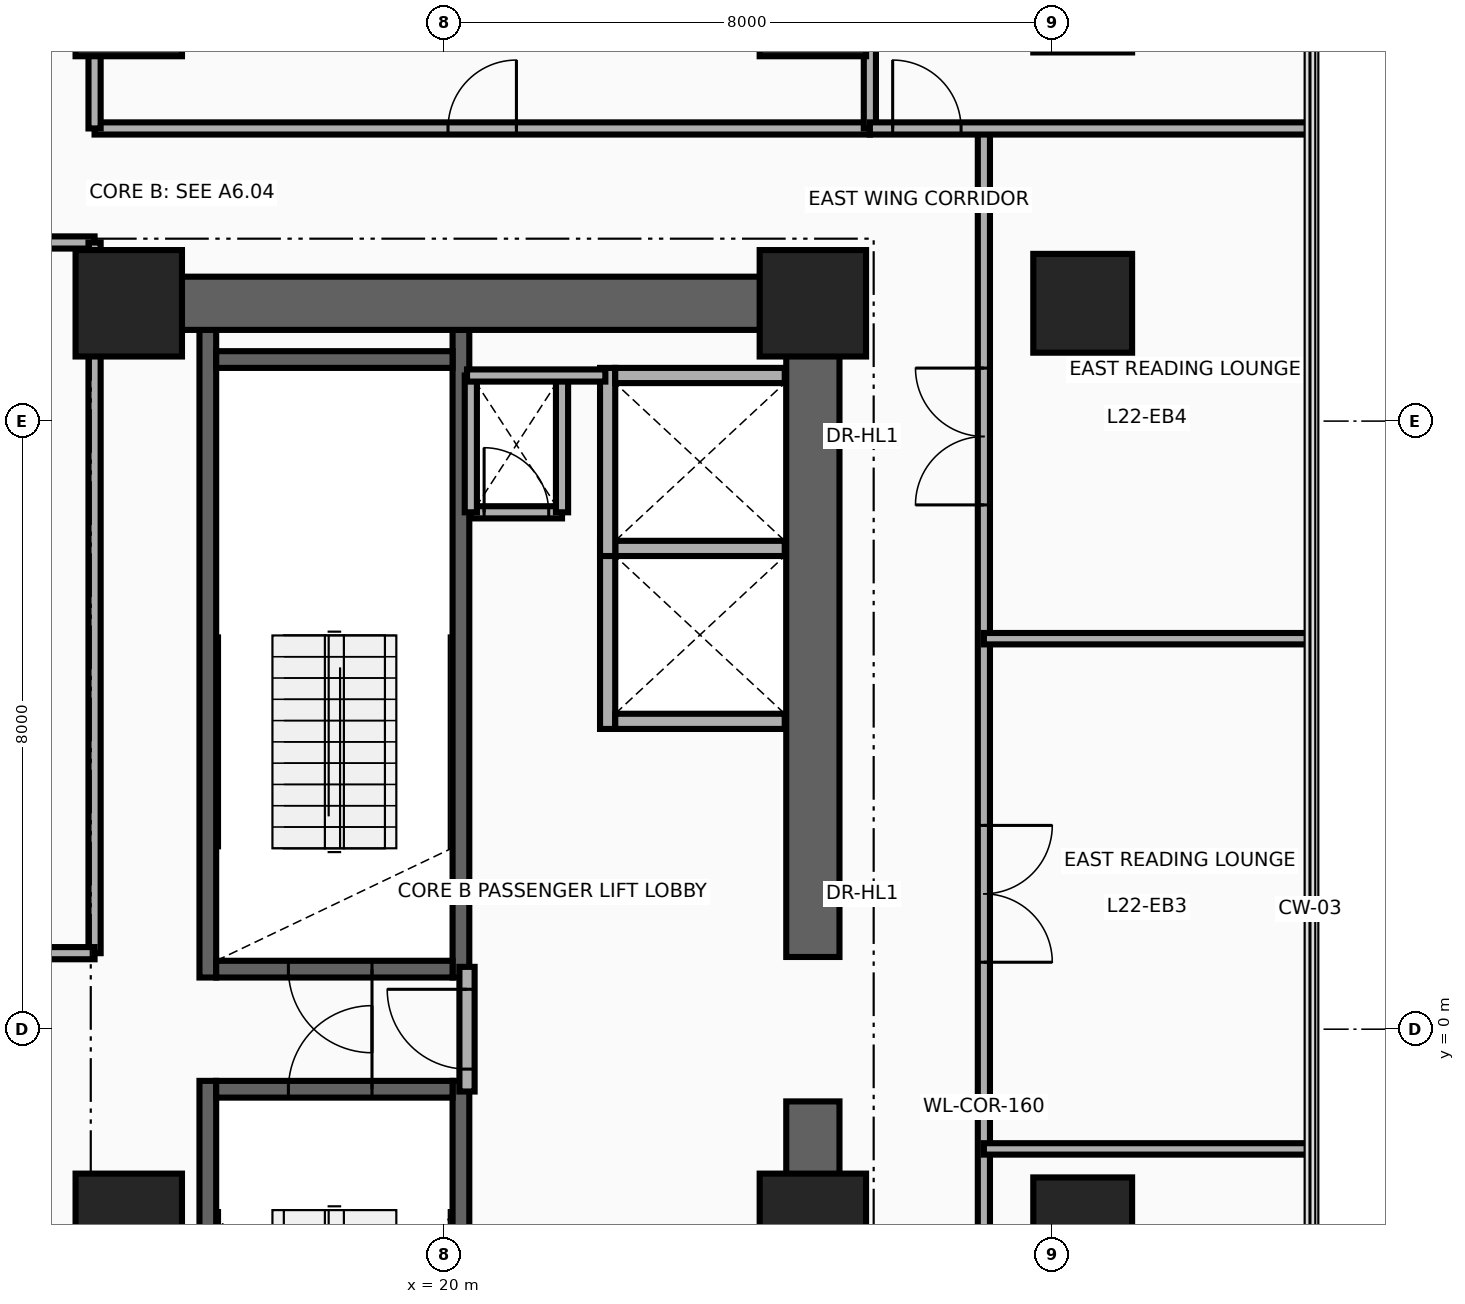
"""IFC4 building model, lengths in metres.
Left out: names, types, materials, properties, quantities, classifications, styles, units other than length and angle.
Written with IfcOpenShell. Run it as: python <this file> out.ifc"""

import sys

from ifc_helpers import new_model, si_unit, direction, frame, frame_2d, origin, origin_2d, place, context, subcontext, project, spatial, rectangle, circle, extrude, source, transform, mapped, element, fill, save


model = new_model("IFC4")
c1 = context("Model", 3, precision=1e-05, world=origin(), true_north=direction((0.0, 1.0)))
c2 = subcontext(c1, "Body", "Model", "MODEL_VIEW")
j1 = project(units=[si_unit("LENGTHUNIT", "METRE"), si_unit("PLANEANGLEUNIT", "RADIAN")], contexts=[c1])
p1 = place(None, origin())
s1 = spatial("IfcSite", under=j1, at=p1, CompositionType="ELEMENT")
p2 = place(p1, origin())
s2 = spatial("IfcBuilding", under=s1, at=p2, CompositionType="ELEMENT")
p3 = place(p2, frame((0.0, 0.0, 88.9)))
s3 = spatial("IfcBuildingStorey", under=s2, at=p3, CompositionType="ELEMENT", Elevation=88.9)
for number, where, z_axis, x_axis in (
    (1, (16.89, 0.68, 0.0), (0.0, 0.0, 1.0), (0.0, 1.0, 0.0)),
    (2, (20.22, 0.68, 0.0), (0.0, 0.0, 1.0), (0.0, 1.0, 0.0)),
):
    element("IfcWall", number, at=place(p3, frame(where, z_axis=z_axis, x_axis=x_axis)), inside=s3, PredefinedType="SHEAR", context=c2, shape_type="SweptSolid", body=[
        extrude(rectangle(XDim=8.52, YDim=0.22, at=frame_2d((4.26, 0.0))), origin(), (0.0, 0.0, 1.0), 3.46),
    ])
p4 = place(p3, frame((17.0, 0.79, 0.0), z_axis=(0.0, 0.0, 1.0), x_axis=(1.0, 0.0, 0.0)))
e3 = element("IfcWall", 3, at=p4, inside=s3, PredefinedType="SHEAR", context=c2, shape_type="SweptSolid", body=[
    extrude(rectangle(XDim=3.11, YDim=0.22, at=frame_2d((1.555, 0.0))), origin(), (0.0, 0.0, 1.0), 3.46),
])
p5 = place(p4, frame((0.95, 0.0, 0.0)))
e4 = element("IfcOpeningElement", 4, at=p5, cuts=e3, PredefinedType="OPENING", context=c2, shape_type="SweptSolid", body=[
    extrude(rectangle(XDim=1.1, YDim=2.15, at=frame_2d((0.55, 1.075))), frame((0.0, 0.125, 0.0), z_axis=(0.0, -1.0, 0.0), x_axis=(1.0, 0.0, 0.0)), (0.0, 0.0, 1.0), 0.25),
])
p6 = place(p3, frame((17.0, 8.81, 0.0), z_axis=(0.0, 0.0, 1.0), x_axis=(1.0, 0.0, 0.0)))
e5 = element("IfcWall", 5, at=p6, inside=s3, PredefinedType="SHEAR", context=c2, shape_type="SweptSolid", body=[
    extrude(rectangle(XDim=3.11, YDim=0.22, at=frame_2d((1.555, 0.0))), origin(), (0.0, 0.0, 1.0), 3.46),
])
for number, where, z_axis, x_axis in (
    (6, (16.89, -9.2, 0.0), (0.0, 0.0, 1.0), (0.0, 1.0, 0.0)),
    (7, (20.22, -9.2, 0.0), (0.0, 0.0, 1.0), (0.0, 1.0, 0.0)),
):
    element("IfcWall", number, at=place(p3, frame(where, z_axis=z_axis, x_axis=x_axis)), inside=s3, PredefinedType="SHEAR", context=c2, shape_type="SweptSolid", body=[
        extrude(rectangle(XDim=8.52, YDim=0.22, at=frame_2d((4.26, 0.0))), origin(), (0.0, 0.0, 1.0), 3.46),
    ])
p7 = place(p3, frame((17.0, -0.79, 0.0), z_axis=(0.0, 0.0, 1.0), x_axis=(1.0, 0.0, 0.0)))
e8 = element("IfcWall", 8, at=p7, inside=s3, PredefinedType="SHEAR", context=c2, shape_type="SweptSolid", body=[
    extrude(rectangle(XDim=3.11, YDim=0.22, at=frame_2d((1.555, 0.0))), origin(), (0.0, 0.0, 1.0), 3.46),
])
p8 = place(p7, frame((0.95, 0.0, 0.0)))
e9 = element("IfcOpeningElement", 9, at=p8, cuts=e8, PredefinedType="OPENING", context=c2, shape_type="SweptSolid", body=[
    extrude(rectangle(XDim=1.1, YDim=2.15, at=frame_2d((0.55, 1.075))), frame((0.0, 0.125, 0.0), z_axis=(0.0, -1.0, 0.0), x_axis=(1.0, 0.0, 0.0)), (0.0, 0.0, 1.0), 0.25),
])
for number, where, z_axis, x_axis in (
    (10, (24.85, -9.9, 0.0), (0.0, 0.0, 1.0), (0.0, 1.0, 0.0)),
    (11, (24.85, 0.95, 0.0), (0.0, 0.0, 1.0), (0.0, 1.0, 0.0)),
):
    element("IfcWall", number, at=place(p3, frame(where, z_axis=z_axis, x_axis=x_axis)), inside=s3, PredefinedType="SHEAR", context=c2, shape_type="SweptSolid", body=[
        extrude(rectangle(XDim=8.95, YDim=0.7, at=frame_2d((4.475, 0.0))), origin(), (0.0, 0.0, 1.0), 3.46),
    ])
p9 = place(p3, frame((15.85, 9.55, 0.0), z_axis=(0.0, 0.0, 1.0), x_axis=(1.0, 0.0, 0.0)))
e12 = element("IfcWall", 12, at=p9, inside=s3, PredefinedType="SHEAR", context=c2, shape_type="SweptSolid", body=[
    extrude(rectangle(XDim=9.0, YDim=0.7, at=frame_2d((4.5, 0.0))), origin(), (0.0, 0.0, 1.0), 3.46),
])
m1 = source(origin(), c2, "Body", "SweptSolid", [
    extrude(rectangle(XDim=1.4, YDim=1.4, at=origin_2d()), origin(), (0.0, 0.0, 1.0), 3.7),
])
for number, where, z_axis, x_axis in (
    (13, (15.85, -2.6, 0.0), (0.0, 0.0, 1.0), (1.0, 0.0, 0.0)),
    (14, (24.85, -2.6, 0.0), (0.0, 0.0, 1.0), (1.0, 0.0, 0.0)),
):
    element("IfcColumn", number, at=place(p3, frame(where, z_axis=z_axis, x_axis=x_axis)), inside=s3, PredefinedType="COLUMN", context=c2, shape_type="MappedRepresentation", body=[
        mapped(m1, transform((0.0, 0.0, 0.0), x_axis=(1.0, 0.0, 0.0), y_axis=(0.0, 1.0, 0.0), z_axis=(0.0, 0.0, 1.0), scale=1.0)),
    ])
m2 = source(origin(), c2, "Body", "SweptSolid", [
    extrude(circle(Radius=0.65, at=origin_2d()), origin(), (0.0, 0.0, 1.0), 3.7),
])
p10 = place(p3, frame((28.4, -2.6, 0.0), z_axis=(0.0, 0.0, 1.0), x_axis=(1.0, 0.0, 0.0)))
e15 = element("IfcColumn", 15, at=p10, inside=s3, PredefinedType="COLUMN", context=c2, shape_type="MappedRepresentation", body=[
    mapped(m2, transform((0.0, 0.0, 0.0), x_axis=(1.0, 0.0, 0.0), y_axis=(0.0, 1.0, 0.0), z_axis=(0.0, 0.0, 1.0), scale=1.0)),
])
for number, where, z_axis, x_axis in (
    (16, (15.85, 9.55, 0.0), (0.0, 0.0, 1.0), (1.0, 0.0, 0.0)),
    (17, (24.85, 9.55, 0.0), (0.0, 0.0, 1.0), (1.0, 0.0, 0.0)),
):
    element("IfcColumn", number, at=place(p3, frame(where, z_axis=z_axis, x_axis=x_axis)), inside=s3, PredefinedType="COLUMN", context=c2, shape_type="MappedRepresentation", body=[
        mapped(m1, transform((0.0, 0.0, 0.0), x_axis=(1.0, 0.0, 0.0), y_axis=(0.0, 1.0, 0.0), z_axis=(0.0, 0.0, 1.0), scale=1.0)),
    ])
p11 = place(p3, frame((28.4, 9.55, 0.0), z_axis=(0.0, 0.0, 1.0), x_axis=(1.0, 0.0, 0.0)))
e18 = element("IfcColumn", 18, at=p11, inside=s3, PredefinedType="COLUMN", context=c2, shape_type="MappedRepresentation", body=[
    mapped(m2, transform((0.0, 0.0, 0.0), x_axis=(1.0, 0.0, 0.0), y_axis=(0.0, 1.0, 0.0), z_axis=(0.0, 0.0, 1.0), scale=1.0)),
])
for number, where, z_axis, x_axis in (
    (19, (15.85, 13.5, 0.0), (0.0, 0.0, 1.0), (1.0, 0.0, 0.0)),
    (20, (24.85, 13.5, 0.0), (0.0, 0.0, 1.0), (1.0, 0.0, 0.0)),
):
    element("IfcColumn", number, at=place(p3, frame(where, z_axis=z_axis, x_axis=x_axis)), inside=s3, PredefinedType="COLUMN", context=c2, shape_type="MappedRepresentation", body=[
        mapped(m1, transform((0.0, 0.0, 0.0), x_axis=(1.0, 0.0, 0.0), y_axis=(0.0, 1.0, 0.0), z_axis=(0.0, 0.0, 1.0), scale=1.0)),
    ])
p12 = place(p3, frame((22.15, 3.95, 0.0), z_axis=(0.0, 0.0, 1.0), x_axis=(0.0, 1.0, 0.0)))
e21 = element("IfcWall", 21, at=p12, inside=s3, PredefinedType="MOVABLE", context=c2, shape_type="SweptSolid", body=[
    extrude(rectangle(XDim=2.475, YDim=0.2, at=frame_2d((1.238, 0.0))), origin(), (0.0, 0.0, 1.0), 3.46),
])
for number, where, z_axis, x_axis in (
    (22, (22.25, 4.05, 0.0), (0.0, 0.0, 1.0), (1.0, 0.0, 0.0)),
    (23, (22.25, 6.325, 0.0), (0.0, 0.0, 1.0), (1.0, 0.0, 0.0)),
):
    element("IfcWall", number, at=place(p3, frame(where, z_axis=z_axis, x_axis=x_axis)), inside=s3, PredefinedType="MOVABLE", context=c2, shape_type="SweptSolid", body=[
        extrude(rectangle(XDim=2.23, YDim=0.2, at=frame_2d((1.115, 0.0))), origin(), (0.0, 0.0, 1.0), 2.245),
    ])
p13 = place(p3, frame((22.15, 6.225, 0.0), z_axis=(0.0, 0.0, 1.0), x_axis=(0.0, 1.0, 0.0)))
e24 = element("IfcWall", 24, at=p13, inside=s3, PredefinedType="MOVABLE", context=c2, shape_type="SweptSolid", body=[
    extrude(rectangle(XDim=2.475, YDim=0.2, at=frame_2d((1.237, 0.0))), origin(), (0.0, 0.0, 1.0), 3.46),
])
p14 = place(p3, frame((22.25, 8.6, 0.0), z_axis=(0.0, 0.0, 1.0), x_axis=(1.0, 0.0, 0.0)))
e25 = element("IfcWall", 25, at=p14, inside=s3, PredefinedType="MOVABLE", context=c2, shape_type="SweptSolid", body=[
    extrude(rectangle(XDim=2.23, YDim=0.2, at=frame_2d((1.115, 0.0))), origin(), (0.0, 0.0, 1.0), 2.245),
])
p15 = place(p3, frame((20.3, -0.82, 0.0), z_axis=(0.0, 0.0, 1.0), x_axis=(0.0, 1.0, 0.0)))
e26 = element("IfcWall", 26, at=p15, inside=s3, PredefinedType="PARTITIONING", context=c2, shape_type="SweptSolid", body=[
    extrude(rectangle(XDim=1.64, YDim=0.2, at=frame_2d((0.82, 0.0))), origin(), (0.0, 0.0, 1.0), 3.46),
])
p16 = place(p15, frame((0.295, 0.0, 0.0)))
e27 = element("IfcOpeningElement", 27, at=p16, cuts=e26, PredefinedType="OPENING", context=c2, shape_type="SweptSolid", body=[
    extrude(rectangle(XDim=1.05, YDim=2.15, at=frame_2d((0.525, 1.075))), frame((0.0, 0.115, 0.0), z_axis=(0.0, -1.0, 0.0), x_axis=(1.0, 0.0, 0.0)), (0.0, 0.0, 1.0), 0.23),
])
p17 = place(p3, frame((20.35, 6.8, 0.0), z_axis=(0.0, 0.0, 1.0), x_axis=(1.0, 0.0, 0.0)))
e28 = element("IfcWall", 28, at=p17, inside=s3, PredefinedType="PARTITIONING", context=c2, shape_type="SweptSolid", body=[
    extrude(rectangle(XDim=1.2, YDim=0.16, at=frame_2d((0.6, 0.0))), origin(), (0.0, 0.0, 1.0), 3.46),
])
p18 = place(p17, frame((0.175, 0.0, 0.0)))
e29 = element("IfcOpeningElement", 29, at=p18, cuts=e28, PredefinedType="OPENING", context=c2, shape_type="SweptSolid", body=[
    extrude(rectangle(XDim=0.85, YDim=2.05, at=frame_2d((0.425, 1.025))), frame((0.0, 0.095, 0.0), z_axis=(0.0, -1.0, 0.0), x_axis=(1.0, 0.0, 0.0)), (0.0, 0.0, 1.0), 0.19),
])
for number, where, z_axis, x_axis in (
    (30, (21.55, 6.8, 0.0), (0.0, 0.0, 1.0), (0.0, 1.0, 0.0)),
    (31, (20.35, 6.8, 0.0), (0.0, 0.0, 1.0), (0.0, 1.0, 0.0)),
):
    element("IfcWall", number, at=place(p3, frame(where, z_axis=z_axis, x_axis=x_axis)), inside=s3, PredefinedType="PARTITIONING", context=c2, shape_type="SweptSolid", body=[
        extrude(rectangle(XDim=1.8, YDim=0.16, at=frame_2d((0.9, 0.0))), origin(), (0.0, 0.0, 1.0), 3.46),
    ])
p19 = place(p3, frame((20.3, 8.6, 0.0), z_axis=(0.0, 0.0, 1.0), x_axis=(1.0, 0.0, 0.0)))
e32 = element("IfcWall", 32, at=p19, inside=s3, PredefinedType="PARTITIONING", context=c2, shape_type="SweptSolid", body=[
    extrude(rectangle(XDim=1.82, YDim=0.16, at=frame_2d((0.91, 0.0))), origin(), (0.0, 0.0, 1.0), 3.46),
])
p20 = place(p3, frame((15.4, 11.85, 0.0), z_axis=(0.0, 0.0, 1.0), x_axis=(1.0, 0.0, 0.0)))
e33 = element("IfcWall", 33, at=p20, inside=s3, PredefinedType="PARTITIONING", context=c2, shape_type="SweptSolid", body=[
    extrude(rectangle(XDim=10.2, YDim=0.16, at=frame_2d((5.1, 0.0))), origin(), (0.0, 0.0, 1.0), 2.834),
])
p21 = place(p20, frame((4.65, 0.0, 0.0)))
e34 = element("IfcOpeningElement", 34, at=p21, cuts=e33, PredefinedType="OPENING", context=c2, shape_type="SweptSolid", body=[
    extrude(rectangle(XDim=0.9, YDim=2.1, at=frame_2d((0.45, 1.05))), frame((0.0, 0.095, 0.0), z_axis=(0.0, -1.0, 0.0), x_axis=(1.0, 0.0, 0.0)), (0.0, 0.0, 1.0), 0.19),
])
p22 = place(p3, frame((15.4, 11.85, 0.0), z_axis=(0.0, 0.0, 1.0), x_axis=(0.0, 1.0, 0.0)))
e35 = element("IfcWall", 35, at=p22, inside=s3, PredefinedType="PARTITIONING", context=c2, shape_type="SweptSolid", body=[
    extrude(rectangle(XDim=6.15, YDim=0.16, at=frame_2d((3.075, 0.0))), origin(), (0.0, 0.0, 1.0), 2.583),
])
p23 = place(p3, frame((25.6, 11.85, 0.0), z_axis=(0.0, 0.0, 1.0), x_axis=(0.0, 1.0, 0.0)))
e36 = element("IfcWall", 36, at=p23, inside=s3, PredefinedType="PARTITIONING", context=c2, shape_type="SweptSolid", body=[
    extrude(rectangle(XDim=5.898, YDim=0.16, at=frame_2d((2.949, 0.0))), origin(), (0.0, 0.0, 1.0), 2.583),
])
p24 = place(p3, frame((27.1, -13.89, 0.0), z_axis=(0.0, 0.0, 1.0), x_axis=(0.0, 1.0, 0.0)))
e37 = element("IfcWall", 37, at=p24, inside=s3, PredefinedType="PARTITIONING", context=c2, shape_type="SweptSolid", body=[
    extrude(rectangle(XDim=25.74, YDim=0.16, at=frame_2d((12.87, 0.0))), origin(), (0.0, 0.0, 1.0), 2.583),
])
p25 = place(p24, frame((2.351, 0.0, 0.0)))
e38 = element("IfcOpeningElement", 38, at=p25, cuts=e37, PredefinedType="OPENING", context=c2, shape_type="SweptSolid", body=[
    extrude(rectangle(XDim=0.9, YDim=2.1, at=frame_2d((0.45, 1.05))), frame((0.0, 0.095, 0.0), z_axis=(0.0, -1.0, 0.0), x_axis=(1.0, 0.0, 0.0)), (0.0, 0.0, 1.0), 0.19),
])
p26 = place(p24, frame((8.059, 0.0, 0.0)))
e39 = element("IfcOpeningElement", 39, at=p26, cuts=e37, PredefinedType="OPENING", context=c2, shape_type="SweptSolid", body=[
    extrude(rectangle(XDim=1.8, YDim=2.15, at=frame_2d((0.9, 1.075))), frame((0.0, 0.095, 0.0), z_axis=(0.0, -1.0, 0.0), x_axis=(1.0, 0.0, 0.0)), (0.0, 0.0, 1.0), 0.19),
])
p27 = place(p24, frame((14.771, 0.0, 0.0)))
e40 = element("IfcOpeningElement", 40, at=p27, cuts=e37, PredefinedType="OPENING", context=c2, shape_type="SweptSolid", body=[
    extrude(rectangle(XDim=1.8, YDim=2.15, at=frame_2d((0.9, 1.075))), frame((0.0, 0.095, 0.0), z_axis=(0.0, -1.0, 0.0), x_axis=(1.0, 0.0, 0.0)), (0.0, 0.0, 1.0), 0.19),
])
p28 = place(p24, frame((20.788, 0.0, 0.0)))
e41 = element("IfcOpeningElement", 41, at=p28, cuts=e37, PredefinedType="OPENING", context=c2, shape_type="SweptSolid", body=[
    extrude(rectangle(XDim=1.8, YDim=2.15, at=frame_2d((0.9, 1.075))), frame((0.0, 0.095, 0.0), z_axis=(0.0, -1.0, 0.0), x_axis=(1.0, 0.0, 0.0)), (0.0, 0.0, 1.0), 0.19),
])
p29 = place(p3, frame((25.6, 11.85, 0.0), z_axis=(0.0, 0.0, 1.0), x_axis=(1.0, 0.0, 0.0)))
e42 = element("IfcWall", 42, at=p29, inside=s3, PredefinedType="PARTITIONING", context=c2, shape_type="SweptSolid", body=[
    extrude(rectangle(XDim=5.79, YDim=0.16, at=frame_2d((2.895, 0.0))), origin(), (0.0, 0.0, 1.0), 2.896),
])
p30 = place(p29, frame((0.3, 0.0, 0.0)))
e43 = element("IfcOpeningElement", 43, at=p30, cuts=e42, PredefinedType="OPENING", context=c2, shape_type="SweptSolid", body=[
    extrude(rectangle(XDim=0.9, YDim=2.1, at=frame_2d((0.45, 1.05))), frame((0.0, 0.095, 0.0), z_axis=(0.0, -1.0, 0.0), x_axis=(1.0, 0.0, 0.0)), (0.0, 0.0, 1.0), 0.19),
])
for number, where, z_axis, x_axis in (
    (44, (27.1, -1.575, 0.0), (0.0, 0.0, 1.0), (1.0, 0.0, 0.0)),
    (45, (27.1, 5.137, 0.0), (0.0, 0.0, 1.0), (1.0, 0.0, 0.0)),
):
    element("IfcWall", number, at=place(p3, frame(where, z_axis=z_axis, x_axis=x_axis)), inside=s3, PredefinedType="PARTITIONING", context=c2, shape_type="SweptSolid", body=[
        extrude(rectangle(XDim=4.29, YDim=0.15, at=frame_2d((2.145, 0.0))), origin(), (0.0, 0.0, 1.0), 2.896),
    ])
p31 = place(p3, frame((13.3, 10.35, 0.0), z_axis=(0.0, 0.0, 1.0), x_axis=(1.0, 0.0, 0.0)))
e46 = element("IfcWall", 46, at=p31, inside=s3, PredefinedType="PARTITIONING", context=c2, shape_type="SweptSolid", body=[
    extrude(rectangle(XDim=2.1, YDim=0.16, at=frame_2d((1.05, 0.0))), origin(), (0.0, 0.0, 1.0), 2.583),
])
p32 = place(p31, frame((0.45, 0.0, 0.0)))
e47 = element("IfcOpeningElement", 47, at=p32, cuts=e46, PredefinedType="OPENING", context=c2, shape_type="SweptSolid", body=[
    extrude(rectangle(XDim=0.9, YDim=2.1, at=frame_2d((0.45, 1.05))), frame((0.0, 0.095, 0.0), z_axis=(0.0, -1.0, 0.0), x_axis=(1.0, 0.0, 0.0)), (0.0, 0.0, 1.0), 0.19),
])
p33 = place(p3, frame((15.4, 1.0, 0.0), z_axis=(0.0, 0.0, 1.0), x_axis=(0.0, 1.0, 0.0)))
e48 = element("IfcWall", 48, at=p33, inside=s3, PredefinedType="PARTITIONING", context=c2, shape_type="SweptSolid", body=[
    extrude(rectangle(XDim=9.35, YDim=0.16, at=frame_2d((4.675, 0.0))), origin(), (0.0, 0.0, 1.0), 2.245),
])
p34 = place(p3, frame((13.41, 1.0, 0.0), z_axis=(0.0, 0.0, 1.0), x_axis=(1.0, 0.0, 0.0)))
e49 = element("IfcWall", 49, at=p34, inside=s3, PredefinedType="PARTITIONING", context=c2, shape_type="SweptSolid", body=[
    extrude(rectangle(XDim=1.99, YDim=0.16, at=frame_2d((0.995, 0.0))), origin(), (0.0, 0.0, 1.0), 2.245),
])
p35 = place(p16, origin())
e50 = element("IfcDoor", 50, at=p35, inside=s3, OperationType="SINGLE_SWING_RIGHT", PredefinedType="DOOR", context=c2, shape_type="SweptSolid", body=[
    extrude(rectangle(XDim=1.05, YDim=2.15, at=frame_2d((0.525, 1.075))), frame((0.0, 0.025, 0.0), z_axis=(0.0, -1.0, 0.0), x_axis=(1.0, 0.0, 0.0)), (0.0, 0.0, 1.0), 0.05),
])
fill(e27, e50)
p36 = place(p5, frame((1.1, 0.0, 0.0), z_axis=(0.0, 0.0, 1.0), x_axis=(-1.0, 0.0, 0.0)))
e51 = element("IfcDoor", 51, at=p36, inside=s3, OperationType="SINGLE_SWING_LEFT", PredefinedType="DOOR", context=c2, shape_type="SweptSolid", body=[
    extrude(rectangle(XDim=1.1, YDim=2.15, at=frame_2d((0.55, 1.075))), frame((0.0, 0.025, 0.0), z_axis=(0.0, -1.0, 0.0), x_axis=(1.0, 0.0, 0.0)), (0.0, 0.0, 1.0), 0.05),
])
fill(e4, e51)
p37 = place(p8, origin())
e52 = element("IfcDoor", 52, at=p37, inside=s3, OperationType="SINGLE_SWING_RIGHT", PredefinedType="DOOR", context=c2, shape_type="SweptSolid", body=[
    extrude(rectangle(XDim=1.1, YDim=2.15, at=frame_2d((0.55, 1.075))), frame((0.0, 0.025, 0.0), z_axis=(0.0, -1.0, 0.0), x_axis=(1.0, 0.0, 0.0)), (0.0, 0.0, 1.0), 0.05),
])
fill(e9, e52)
p38 = place(p18, origin())
e53 = element("IfcDoor", 53, at=p38, inside=s3, OperationType="SINGLE_SWING_LEFT", PredefinedType="DOOR", context=c2, shape_type="SweptSolid", body=[
    extrude(rectangle(XDim=0.85, YDim=2.05, at=frame_2d((0.425, 1.025))), frame((0.0, 0.025, 0.0), z_axis=(0.0, -1.0, 0.0), x_axis=(1.0, 0.0, 0.0)), (0.0, 0.0, 1.0), 0.05),
])
fill(e29, e53)
p39 = place(p21, origin())
e54 = element("IfcDoor", 54, at=p39, inside=s3, OperationType="SINGLE_SWING_RIGHT", PredefinedType="DOOR", context=c2, shape_type="SweptSolid", body=[
    extrude(rectangle(XDim=0.9, YDim=2.1, at=frame_2d((0.45, 1.05))), frame((0.0, 0.025, 0.0), z_axis=(0.0, -1.0, 0.0), x_axis=(1.0, 0.0, 0.0)), (0.0, 0.0, 1.0), 0.05),
])
fill(e34, e54)
p40 = place(p30, origin())
e55 = element("IfcDoor", 55, at=p40, inside=s3, OperationType="SINGLE_SWING_RIGHT", PredefinedType="DOOR", context=c2, shape_type="SweptSolid", body=[
    extrude(rectangle(XDim=0.9, YDim=2.1, at=frame_2d((0.45, 1.05))), frame((0.0, 0.025, 0.0), z_axis=(0.0, -1.0, 0.0), x_axis=(1.0, 0.0, 0.0)), (0.0, 0.0, 1.0), 0.05),
])
fill(e43, e55)
p41 = place(p27, frame((1.8, 0.0, 0.0), z_axis=(0.0, 0.0, 1.0), x_axis=(-1.0, 0.0, 0.0)))
e56 = element("IfcDoor", 56, at=p41, inside=s3, OperationType="DOUBLE_DOOR_SINGLE_SWING", PredefinedType="DOOR", context=c2, shape_type="SweptSolid", body=[
    extrude(rectangle(XDim=1.8, YDim=2.15, at=frame_2d((0.9, 1.075))), frame((0.0, 0.025, 0.0), z_axis=(0.0, -1.0, 0.0), x_axis=(1.0, 0.0, 0.0)), (0.0, 0.0, 1.0), 0.05),
])
fill(e40, e56)
p42 = place(p28, origin())
e57 = element("IfcDoor", 57, at=p42, inside=s3, OperationType="DOUBLE_DOOR_SINGLE_SWING", PredefinedType="DOOR", context=c2, shape_type="SweptSolid", body=[
    extrude(rectangle(XDim=1.8, YDim=2.15, at=frame_2d((0.9, 1.075))), frame((0.0, 0.025, 0.0), z_axis=(0.0, -1.0, 0.0), x_axis=(1.0, 0.0, 0.0)), (0.0, 0.0, 1.0), 0.05),
])
fill(e41, e57)
save(model, sys.argv[1])
